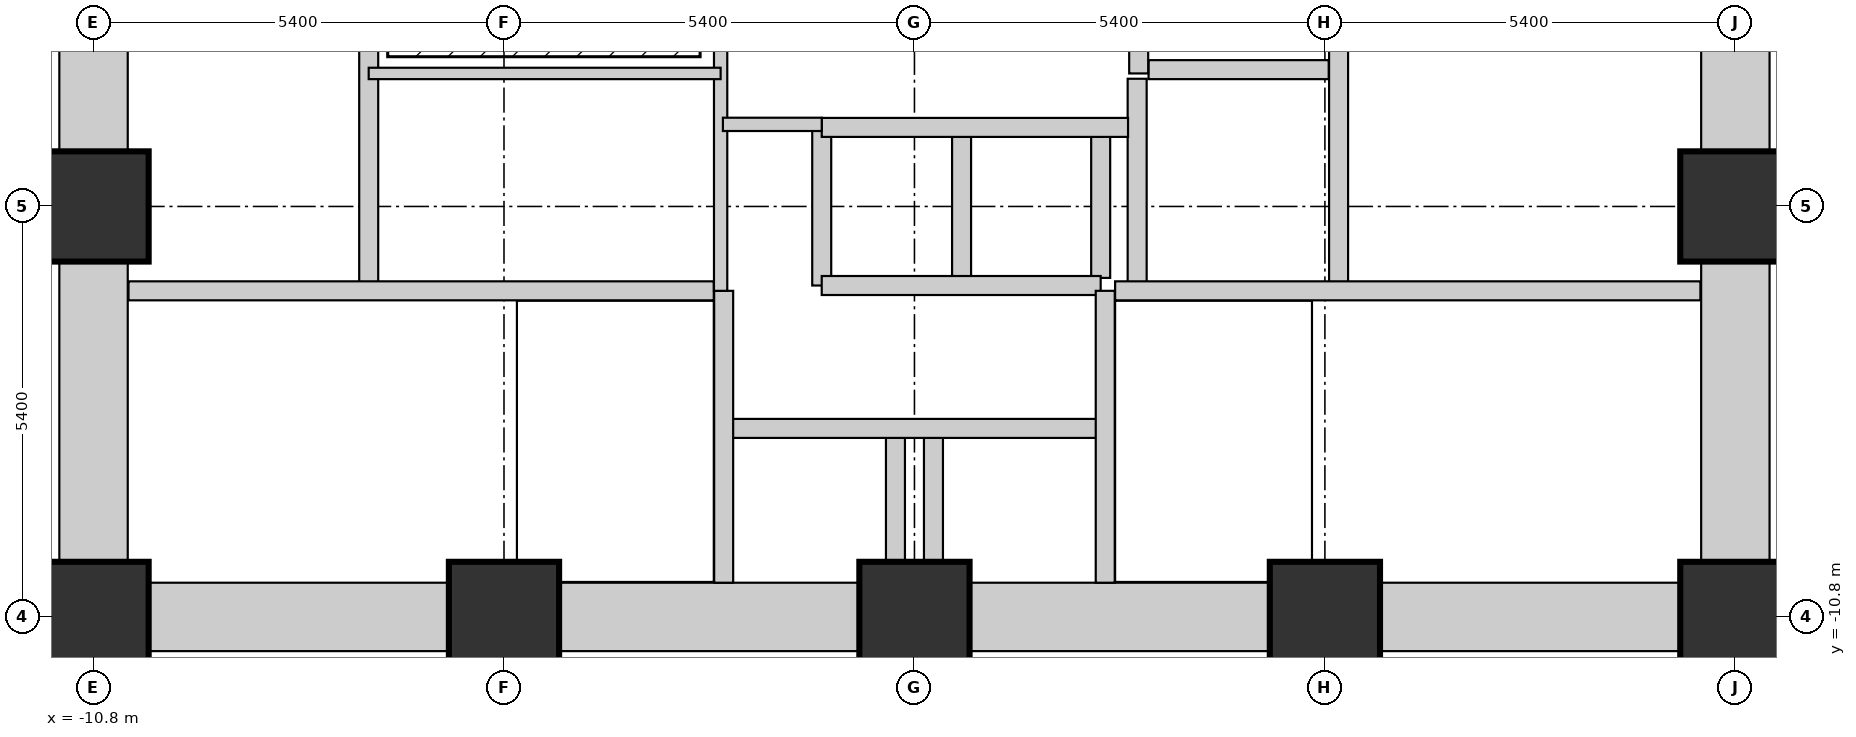
"""IFC4 building model, lengths in metres.
Left out: names, types, materials, properties, quantities, classifications, styles, units other than length and angle.
Written with IfcOpenShell. Run it as: python <this file> out.ifc"""

import sys

from ifc_helpers import new_model, si_unit, direction, frame, frame_2d, origin, origin_2d, place, context, subcontext, project, spatial, rectangle, extrude, element, fill, save


model = new_model("IFC4")
c1 = context("Model", 3, precision=1e-05, world=origin(), true_north=direction((0.0, 1.0)))
c2 = subcontext(c1, "Body", "Model", "MODEL_VIEW")
j1 = project(units=[si_unit("LENGTHUNIT", "METRE"), si_unit("PLANEANGLEUNIT", "RADIAN")], contexts=[c1])
p1 = place(None, origin())
s1 = spatial("IfcSite", under=j1, at=p1, CompositionType="ELEMENT")
p2 = place(p1, origin())
s2 = spatial("IfcBuilding", under=s1, at=p2, CompositionType="ELEMENT")
p3 = place(p2, frame((0.0, 0.0, 9.0)))
s3 = spatial("IfcBuildingStorey", under=s2, at=p3, CompositionType="ELEMENT", Elevation=9.0)
for number, where, z_axis, x_axis in (
    (1, (-10.8, -10.8, 0.0), (0.0, 0.0, 1.0), (1.0, 0.0, 0.0)),
    (2, (-10.8, -5.4, 0.0), (0.0, 0.0, 1.0), (1.0, 0.0, 0.0)),
    (3, (-5.4, -10.8, 0.0), (0.0, 0.0, 1.0), (1.0, 0.0, 0.0)),
    (4, (0.0, -10.8, 0.0), (0.0, 0.0, 1.0), (1.0, 0.0, 0.0)),
    (5, (5.4, -10.8, 0.0), (0.0, 0.0, 1.0), (1.0, 0.0, 0.0)),
    (6, (10.8, -10.8, 0.0), (0.0, 0.0, 1.0), (1.0, 0.0, 0.0)),
    (7, (10.8, -5.4, 0.0), (0.0, 0.0, 1.0), (1.0, 0.0, 0.0)),
):
    element("IfcColumn", number, at=place(p3, frame(where, z_axis=z_axis, x_axis=x_axis)), inside=s3, PredefinedType="COLUMN", context=c2, shape_type="SweptSolid", body=[
        extrude(rectangle(XDim=1.45, YDim=1.45, at=origin_2d()), origin(), (0.0, 0.0, 1.0), 4.5),
    ])
for number, where, z_axis, x_axis in (
    (8, (-10.065, -10.8, 0.0), (0.0, 0.0, 1.0), (1.0, 0.0, 0.0)),
    (9, (-10.8, -10.065, 0.0), (0.0, 0.0, 1.0), (0.0, 1.0, 0.0)),
    (10, (10.8, -10.065, 0.0), (0.0, 0.0, 1.0), (0.0, 1.0, 0.0)),
    (11, (-4.665, -10.8, 0.0), (0.0, 0.0, 1.0), (1.0, 0.0, 0.0)),
):
    element("IfcWall", number, at=place(p3, frame(where, z_axis=z_axis, x_axis=x_axis)), inside=s3, PredefinedType="SHEAR", context=c2, shape_type="SweptSolid", body=[
        extrude(rectangle(XDim=3.93, YDim=0.9, at=frame_2d((1.965, 0.0))), origin(), (0.0, 0.0, 1.0), 4.5),
    ])
p4 = place(p3, frame((-10.8, -4.665, 0.0), z_axis=(0.0, 0.0, 1.0), x_axis=(0.0, 1.0, 0.0)))
e12 = element("IfcWall", 12, at=p4, inside=s3, PredefinedType="SHEAR", context=c2, shape_type="SweptSolid", body=[
    extrude(rectangle(XDim=3.93, YDim=0.9, at=frame_2d((1.965, 0.0))), origin(), (0.0, 0.0, 1.0), 4.5),
])
p5 = place(p4, frame((1.415, 0.0, 0.0)))
e13 = element("IfcOpeningElement", 13, at=p5, cuts=e12, PredefinedType="OPENING", context=c2, shape_type="SweptSolid", body=[
    extrude(rectangle(XDim=1.1, YDim=2.1, at=frame_2d((0.55, 1.05))), frame((0.0, 0.46, 0.0), z_axis=(0.0, -1.0, 0.0), x_axis=(1.0, 0.0, 0.0)), (0.0, 0.0, 1.0), 0.92),
])
p6 = place(p3, frame((10.8, -4.665, 0.0), z_axis=(0.0, 0.0, 1.0), x_axis=(0.0, 1.0, 0.0)))
e14 = element("IfcWall", 14, at=p6, inside=s3, PredefinedType="SHEAR", context=c2, shape_type="SweptSolid", body=[
    extrude(rectangle(XDim=3.93, YDim=0.9, at=frame_2d((1.965, 0.0))), origin(), (0.0, 0.0, 1.0), 4.5),
])
p7 = place(p6, frame((1.415, 0.0, 0.0)))
e15 = element("IfcOpeningElement", 15, at=p7, cuts=e14, PredefinedType="OPENING", context=c2, shape_type="SweptSolid", body=[
    extrude(rectangle(XDim=1.1, YDim=2.1, at=frame_2d((0.55, 1.05))), frame((0.0, 0.46, 0.0), z_axis=(0.0, -1.0, 0.0), x_axis=(1.0, 0.0, 0.0)), (0.0, 0.0, 1.0), 0.92),
])
for number, where, z_axis, x_axis in (
    (16, (0.735, -10.8, 0.0), (0.0, 0.0, 1.0), (1.0, 0.0, 0.0)),
    (17, (6.135, -10.8, 0.0), (0.0, 0.0, 1.0), (1.0, 0.0, 0.0)),
):
    element("IfcWall", number, at=place(p3, frame(where, z_axis=z_axis, x_axis=x_axis)), inside=s3, PredefinedType="SHEAR", context=c2, shape_type="SweptSolid", body=[
        extrude(rectangle(XDim=3.93, YDim=0.9, at=frame_2d((1.965, 0.0))), origin(), (0.0, 0.0, 1.0), 4.5),
    ])
p8 = place(p3, frame((2.93, -6.51, 0.0), z_axis=(0.0, 0.0, 1.0), x_axis=(0.0, 1.0, 0.0)))
e18 = element("IfcWall", 18, at=p8, inside=s3, PredefinedType="SHEAR", context=c2, shape_type="SweptSolid", body=[
    extrude(rectangle(XDim=2.79, YDim=0.25, at=frame_2d((1.395, 0.0))), origin(), (0.0, 0.0, 1.0), 4.5),
])
p9 = place(p3, frame((3.08, -3.6, 0.0), z_axis=(0.0, 0.0, 1.0), x_axis=(1.0, 0.0, 0.0)))
e19 = element("IfcWall", 19, at=p9, inside=s3, PredefinedType="SHEAR", context=c2, shape_type="SweptSolid", body=[
    extrude(rectangle(XDim=2.37, YDim=0.25, at=frame_2d((1.185, 0.0))), origin(), (0.0, 0.0, 1.0), 4.5),
])
p10 = place(p3, frame((5.58, -6.51, 0.0), z_axis=(0.0, 0.0, 1.0), x_axis=(0.0, 1.0, 0.0)))
e20 = element("IfcWall", 20, at=p10, inside=s3, PredefinedType="SHEAR", context=c2, shape_type="SweptSolid", body=[
    extrude(rectangle(XDim=5.09, YDim=0.25, at=frame_2d((2.545, 0.0))), origin(), (0.0, 0.0, 1.0), 4.5),
])
p11 = place(p10, frame((0.85, 0.0, 0.0)))
e21 = element("IfcOpeningElement", 21, at=p11, cuts=e20, PredefinedType="OPENING", context=c2, shape_type="SweptSolid", body=[
    extrude(rectangle(XDim=1.1, YDim=2.1, at=frame_2d((0.55, 1.05))), frame((0.0, 0.135, 0.0), z_axis=(0.0, -1.0, 0.0), x_axis=(1.0, 0.0, 0.0)), (0.0, 0.0, 1.0), 0.27),
])
for number, where, z_axis, x_axis in (
    (22, (0.62, -6.34, 0.0), (0.0, 0.0, 1.0), (0.0, 1.0, 0.0)),
    (23, (2.45, -6.34, 0.0), (0.0, 0.0, 1.0), (0.0, 1.0, 0.0)),
):
    element("IfcWall", number, at=place(p3, frame(where, z_axis=z_axis, x_axis=x_axis)), inside=s3, PredefinedType="SHEAR", context=c2, shape_type="SweptSolid", body=[
        extrude(rectangle(XDim=1.88, YDim=0.25, at=frame_2d((0.94, 0.0))), origin(), (0.0, 0.0, 1.0), 4.5),
    ])
for number, where, z_axis, x_axis in (
    (24, (-0.25, -10.075, 0.0), (0.0, 0.0, 1.0), (0.0, 1.0, 0.0)),
    (25, (0.25, -10.075, 0.0), (0.0, 0.0, 1.0), (0.0, 1.0, 0.0)),
):
    element("IfcWall", number, at=place(p3, frame(where, z_axis=z_axis, x_axis=x_axis)), inside=s3, PredefinedType="SHEAR", context=c2, shape_type="SweptSolid", body=[
        extrude(rectangle(XDim=1.635, YDim=0.25, at=frame_2d((0.817, 0.0))), origin(), (0.0, 0.0, 1.0), 4.5),
    ])
p12 = place(p3, frame((-1.22, -6.44, 0.0), z_axis=(0.0, 0.0, 1.0), x_axis=(0.0, 1.0, 0.0)))
e26 = element("IfcWall", 26, at=p12, inside=s3, PredefinedType="SHEAR", context=c2, shape_type="SweptSolid", body=[
    extrude(rectangle(XDim=2.08, YDim=0.25, at=frame_2d((1.04, 0.0))), origin(), (0.0, 0.0, 1.0), 4.5),
])
p13 = place(p3, frame((-1.22, -6.44, 0.0), z_axis=(0.0, 0.0, 1.0), x_axis=(1.0, 0.0, 0.0)))
e27 = element("IfcWall", 27, at=p13, inside=s3, PredefinedType="SHEAR", context=c2, shape_type="SweptSolid", body=[
    extrude(rectangle(XDim=3.67, YDim=0.25, at=frame_2d((1.835, 0.0))), origin(), (0.0, 0.0, 1.0), 4.5),
])
p14 = place(p3, frame((-2.48, -8.32, 0.0), z_axis=(0.0, 0.0, 1.0), x_axis=(1.0, 0.0, 0.0)))
e28 = element("IfcWall", 28, at=p14, inside=s3, PredefinedType="SHEAR", context=c2, shape_type="SweptSolid", body=[
    extrude(rectangle(XDim=4.93, YDim=0.25, at=frame_2d((2.465, 0.0))), origin(), (0.0, 0.0, 1.0), 4.5),
])
p15 = place(p3, frame((-1.22, -4.36, 0.0), z_axis=(0.0, 0.0, 1.0), x_axis=(1.0, 0.0, 0.0)))
e29 = element("IfcWall", 29, at=p15, inside=s3, PredefinedType="SHEAR", context=c2, shape_type="SweptSolid", body=[
    extrude(rectangle(XDim=4.03, YDim=0.25, at=frame_2d((2.015, 0.0))), origin(), (0.0, 0.0, 1.0), 4.5),
])
p16 = place(p3, frame((2.95, -3.65, 0.0), z_axis=(0.0, 0.0, 1.0), x_axis=(0.0, 1.0, 0.0)))
e30 = element("IfcWall", 30, at=p16, inside=s3, PredefinedType="SHEAR", context=c2, shape_type="SweptSolid", body=[
    extrude(rectangle(XDim=2.4, YDim=0.25, at=frame_2d((1.2, 0.0))), origin(), (0.0, 0.0, 1.0), 4.5),
])
p17 = place(p16, frame((0.775, 0.0, 0.0)))
e31 = element("IfcOpeningElement", 31, at=p17, cuts=e30, PredefinedType="OPENING", context=c2, shape_type="SweptSolid", body=[
    extrude(rectangle(XDim=0.85, YDim=2.1, at=frame_2d((0.425, 1.05))), frame((0.0, 0.135, 0.0), z_axis=(0.0, -1.0, 0.0), x_axis=(1.0, 0.0, 0.0)), (0.0, 0.0, 1.0), 0.27),
])
p18 = place(p3, frame((2.64, -6.51, 0.0), z_axis=(0.0, 0.0, 1.0), x_axis=(1.0, 0.0, 0.0)))
e32 = element("IfcWall", 32, at=p18, inside=s3, PredefinedType="SHEAR", context=c2, shape_type="SweptSolid", body=[
    extrude(rectangle(XDim=7.7, YDim=0.25, at=frame_2d((3.85, 0.0))), origin(), (0.0, 0.0, 1.0), 4.5),
])
p19 = place(p18, frame((6.0, 0.0, 0.0)))
e33 = element("IfcOpeningElement", 33, at=p19, cuts=e32, PredefinedType="OPENING", context=c2, shape_type="SweptSolid", body=[
    extrude(rectangle(XDim=0.95, YDim=2.1, at=frame_2d((0.475, 1.05))), frame((0.0, 0.135, 0.0), z_axis=(0.0, -1.0, 0.0), x_axis=(1.0, 0.0, 0.0)), (0.0, 0.0, 1.0), 0.27),
])
for number, where, z_axis, x_axis in (
    (34, (2.51, -10.35, 0.0), (0.0, 0.0, 1.0), (0.0, 1.0, 0.0)),
    (35, (-2.51, -10.35, 0.0), (0.0, 0.0, 1.0), (0.0, 1.0, 0.0)),
):
    element("IfcWall", number, at=place(p3, frame(where, z_axis=z_axis, x_axis=x_axis)), inside=s3, PredefinedType="SHEAR", context=c2, shape_type="SweptSolid", body=[
        extrude(rectangle(XDim=3.84, YDim=0.25, at=frame_2d((1.92, 0.0))), origin(), (0.0, 0.0, 1.0), 4.5),
    ])
p20 = place(p3, frame((-7.18, -6.51, 0.0), z_axis=(0.0, 0.0, 1.0), x_axis=(0.0, 1.0, 0.0)))
e36 = element("IfcWall", 36, at=p20, inside=s3, PredefinedType="SHEAR", context=c2, shape_type="SweptSolid", body=[
    extrude(rectangle(XDim=5.09, YDim=0.25, at=frame_2d((2.545, 0.0))), origin(), (0.0, 0.0, 1.0), 4.5),
])
p21 = place(p3, frame((-10.34, -6.51, 0.0), z_axis=(0.0, 0.0, 1.0), x_axis=(1.0, 0.0, 0.0)))
e37 = element("IfcWall", 37, at=p21, inside=s3, PredefinedType="SHEAR", context=c2, shape_type="SweptSolid", body=[
    extrude(rectangle(XDim=7.7, YDim=0.25, at=frame_2d((3.85, 0.0))), origin(), (0.0, 0.0, 1.0), 4.5),
])
p22 = place(p21, frame((0.35, 0.0, 0.0)))
e38 = element("IfcOpeningElement", 38, at=p22, cuts=e37, PredefinedType="OPENING", context=c2, shape_type="SweptSolid", body=[
    extrude(rectangle(XDim=1.1, YDim=2.1, at=frame_2d((0.55, 1.05))), frame((0.0, 0.135, 0.0), z_axis=(0.0, -1.0, 0.0), x_axis=(1.0, 0.0, 0.0)), (0.0, 0.0, 1.0), 0.27),
])
p23 = place(p3, frame((-2.55, -6.51, 0.0), z_axis=(0.0, 0.0, 1.0), x_axis=(0.0, 1.0, 0.0)))
e39 = element("IfcWall", 39, at=p23, inside=s3, PredefinedType="PARTITIONING", context=c2, shape_type="SweptSolid", body=[
    extrude(rectangle(XDim=5.16, YDim=0.175, at=frame_2d((2.58, 0.0))), origin(), (0.0, 0.0, 1.0), 4.25),
])
p24 = place(p23, frame((3.45, 0.0, 0.0)))
e40 = element("IfcOpeningElement", 40, at=p24, cuts=e39, PredefinedType="OPENING", context=c2, shape_type="SweptSolid", body=[
    extrude(rectangle(XDim=0.85, YDim=2.1, at=frame_2d((0.425, 1.05))), frame((0.0, 0.097, 0.0), z_axis=(0.0, -1.0, 0.0), x_axis=(1.0, 0.0, 0.0)), (0.0, 0.0, 1.0), 0.195),
])
p25 = place(p3, frame((-7.18, -3.65, 0.0), z_axis=(0.0, 0.0, 1.0), x_axis=(1.0, 0.0, 0.0)))
e41 = element("IfcWall", 41, at=p25, inside=s3, PredefinedType="PARTITIONING", context=c2, shape_type="SweptSolid", body=[
    extrude(rectangle(XDim=4.63, YDim=0.15, at=frame_2d((2.315, 0.0))), origin(), (0.0, 0.0, 1.0), 4.25),
])
p26 = place(p25, frame((1.0, 0.0, 0.0)))
e42 = element("IfcOpeningElement", 42, at=p26, cuts=e41, PredefinedType="OPENING", context=c2, shape_type="SweptSolid", body=[
    extrude(rectangle(XDim=0.85, YDim=2.1, at=frame_2d((0.425, 1.05))), frame((0.0, 0.085, 0.0), z_axis=(0.0, -1.0, 0.0), x_axis=(1.0, 0.0, 0.0)), (0.0, 0.0, 1.0), 0.17),
])
p27 = place(p3, frame((-2.52, -4.32, 0.0), z_axis=(0.0, 0.0, 1.0), x_axis=(1.0, 0.0, 0.0)))
e43 = element("IfcWall", 43, at=p27, inside=s3, PredefinedType="PARTITIONING", context=c2, shape_type="SweptSolid", body=[
    extrude(rectangle(XDim=1.3, YDim=0.175, at=frame_2d((0.65, 0.0))), origin(), (0.0, 0.0, 1.0), 4.25),
])
p28 = place(p27, frame((0.22, 0.0, 0.0)))
e44 = element("IfcOpeningElement", 44, at=p28, cuts=e43, PredefinedType="OPENING", context=c2, shape_type="SweptSolid", body=[
    extrude(rectangle(XDim=0.85, YDim=2.1, at=frame_2d((0.425, 1.05))), frame((0.0, 0.097, 0.0), z_axis=(0.0, -1.0, 0.0), x_axis=(1.0, 0.0, 0.0)), (0.0, 0.0, 1.0), 0.195),
])
p29 = place(p19, origin())
e45 = element("IfcDoor", 45, at=p29, inside=s3, OperationType="SINGLE_SWING_RIGHT", PredefinedType="DOOR", context=c2, shape_type="SweptSolid", body=[
    extrude(rectangle(XDim=0.95, YDim=2.1, at=frame_2d((0.475, 1.05))), frame((0.0, 0.025, 0.0), z_axis=(0.0, -1.0, 0.0), x_axis=(1.0, 0.0, 0.0)), (0.0, 0.0, 1.0), 0.05),
])
fill(e33, e45)
p30 = place(p22, origin())
e46 = element("IfcDoor", 46, at=p30, inside=s3, OperationType="SINGLE_SWING_RIGHT", PredefinedType="DOOR", context=c2, shape_type="SweptSolid", body=[
    extrude(rectangle(XDim=1.1, YDim=2.1, at=frame_2d((0.55, 1.05))), frame((0.0, 0.025, 0.0), z_axis=(0.0, -1.0, 0.0), x_axis=(1.0, 0.0, 0.0)), (0.0, 0.0, 1.0), 0.05),
])
fill(e38, e46)
p31 = place(p11, origin())
e47 = element("IfcDoor", 47, at=p31, inside=s3, OperationType="SLIDING_TO_RIGHT", PredefinedType="DOOR", context=c2, shape_type="SweptSolid", body=[
    extrude(rectangle(XDim=1.1, YDim=2.1, at=frame_2d((0.55, 1.05))), frame((0.0, 0.025, 0.0), z_axis=(0.0, -1.0, 0.0), x_axis=(1.0, 0.0, 0.0)), (0.0, 0.0, 1.0), 0.05),
])
fill(e21, e47)
p32 = place(p28, origin())
e48 = element("IfcDoor", 48, at=p32, inside=s3, OperationType="SINGLE_SWING_LEFT", PredefinedType="DOOR", context=c2, shape_type="SweptSolid", body=[
    extrude(rectangle(XDim=0.85, YDim=2.1, at=frame_2d((0.425, 1.05))), frame((0.0, 0.025, 0.0), z_axis=(0.0, -1.0, 0.0), x_axis=(1.0, 0.0, 0.0)), (0.0, 0.0, 1.0), 0.05),
])
fill(e44, e48)
p33 = place(p26, origin())
e49 = element("IfcDoor", 49, at=p33, inside=s3, OperationType="SINGLE_SWING_LEFT", PredefinedType="DOOR", context=c2, shape_type="SweptSolid", body=[
    extrude(rectangle(XDim=0.85, YDim=2.1, at=frame_2d((0.425, 1.05))), frame((0.0, 0.025, 0.0), z_axis=(0.0, -1.0, 0.0), x_axis=(1.0, 0.0, 0.0)), (0.0, 0.0, 1.0), 0.05),
])
fill(e42, e49)
save(model, sys.argv[1])
